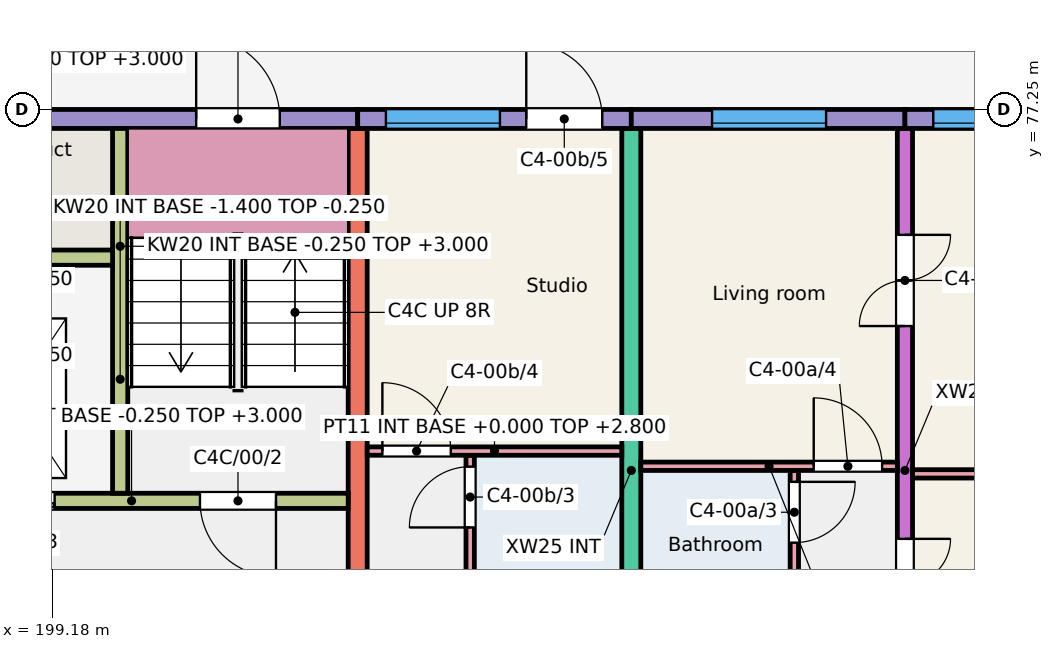
"""IFC4 building model, lengths in metres.
Left out: names, types, materials, properties, quantities, classifications, styles, units other than length and angle.
Written with IfcOpenShell. Run it as: python <this file> out.ifc"""

import sys

from ifc_helpers import new_model, si_unit, direction, frame, frame_2d, origin, place, context, subcontext, project, spatial, rectangle, extrude, element, fill, save


model = new_model("IFC4")
c1 = context("Model", 3, precision=1e-05, world=origin(), true_north=direction((0.0, 1.0)))
c2 = subcontext(c1, "Body", "Model", "MODEL_VIEW")
j1 = project(units=[si_unit("LENGTHUNIT", "METRE"), si_unit("PLANEANGLEUNIT", "RADIAN")], contexts=[c1])
p1 = place(None, origin())
s1 = spatial("IfcSite", under=j1, at=p1, CompositionType="ELEMENT")
p2 = place(p1, origin())
s2 = spatial("IfcBuilding", under=s1, at=p2, CompositionType="ELEMENT")
p3 = place(p2, origin())
s3 = spatial("IfcBuildingStorey", under=s2, at=p3, CompositionType="ELEMENT", Elevation=0.0)
for number, where, z_axis, x_axis in (
    (1, (203.2, 68.0, -0.25), (0.0, 0.0, 1.0), (0.0, 1.0, 0.0)),
    (2, (206.8, 68.0, -0.25), (0.0, 0.0, 1.0), (0.0, 1.0, 0.0)),
):
    element("IfcWall", number, at=place(p3, frame(where, z_axis=z_axis, x_axis=x_axis)), inside=s3, PredefinedType="SHEAR", context=c2, shape_type="SweptSolid", body=[
        extrude(rectangle(XDim=9.0, YDim=0.25, at=frame_2d((4.5, 0.0))), origin(), (0.0, 0.0, 1.0), 3.25),
    ])
p4 = place(p3, frame((210.4, 68.0, -0.25), z_axis=(0.0, 0.0, 1.0), x_axis=(0.0, 1.0, 0.0)))
e3 = element("IfcWall", 3, at=p4, inside=s3, PredefinedType="SHEAR", context=c2, shape_type="SweptSolid", body=[
    extrude(rectangle(XDim=9.0, YDim=0.2, at=frame_2d((4.5, 0.0))), origin(), (0.0, 0.0, 1.0), 3.25),
])
p5 = place(p4, frame((2.4, 0.0, 0.25)))
e4 = element("IfcOpeningElement", 4, at=p5, cuts=e3, PredefinedType="OPENING", context=c2, shape_type="SweptSolid", body=[
    extrude(rectangle(XDim=1.2, YDim=2.1, at=frame_2d((0.6, 1.05))), frame((0.0, 0.11, 0.0), z_axis=(0.0, -1.0, 0.0), x_axis=(1.0, 0.0, 0.0)), (0.0, 0.0, 1.0), 0.22),
])
p6 = place(p4, frame((6.4, 0.0, 0.25)))
e5 = element("IfcOpeningElement", 5, at=p6, cuts=e3, PredefinedType="OPENING", context=c2, shape_type="SweptSolid", body=[
    extrude(rectangle(XDim=1.2, YDim=2.1, at=frame_2d((0.6, 1.05))), frame((0.0, 0.11, 0.0), z_axis=(0.0, -1.0, 0.0), x_axis=(1.0, 0.0, 0.0)), (0.0, 0.0, 1.0), 0.22),
])
p7 = place(p3, frame((197.2, 77.125, -0.25), z_axis=(0.0, 0.0, 1.0), x_axis=(1.0, 0.0, 0.0)))
e6 = element("IfcWall", 6, at=p7, inside=s3, PredefinedType="SOLIDWALL", context=c2, shape_type="SweptSolid", body=[
    extrude(rectangle(XDim=6.0, YDim=0.25, at=frame_2d((3.0, 0.0))), origin(), (0.0, 0.0, 1.0), 3.25),
])
p8 = place(p7, frame((3.875, 0.0, 0.25)))
e7 = element("IfcOpeningElement", 7, at=p8, cuts=e6, PredefinedType="OPENING", context=c2, shape_type="SweptSolid", body=[
    extrude(rectangle(XDim=1.1, YDim=2.1, at=frame_2d((0.55, 1.05))), frame((0.0, 0.135, 0.0), z_axis=(0.0, -1.0, 0.0), x_axis=(1.0, 0.0, 0.0)), (0.0, 0.0, 1.0), 0.27),
])
p9 = place(p3, frame((197.35, 72.1, -0.25), z_axis=(0.0, 0.0, 1.0), x_axis=(1.0, 0.0, 0.0)))
e8 = element("IfcWall", 8, at=p9, inside=s3, PredefinedType="SHEAR", context=c2, shape_type="SweptSolid", body=[
    extrude(rectangle(XDim=5.725, YDim=0.2, at=frame_2d((2.862, 0.0))), origin(), (0.0, 0.0, 1.0), 3.25),
])
p10 = place(p9, frame((3.775, 0.0, 0.25)))
e9 = element("IfcOpeningElement", 9, at=p10, cuts=e8, PredefinedType="OPENING", context=c2, shape_type="SweptSolid", body=[
    extrude(rectangle(XDim=1.0, YDim=2.1, at=frame_2d((0.5, 1.05))), frame((0.0, 0.11, 0.0), z_axis=(0.0, -1.0, 0.0), x_axis=(1.0, 0.0, 0.0)), (0.0, 0.0, 1.0), 0.22),
])
p11 = place(p9, frame((0.762, 0.0, 0.25)))
e10 = element("IfcOpeningElement", 10, at=p11, cuts=e8, PredefinedType="OPENING", context=c2, shape_type="SweptSolid", body=[
    extrude(rectangle(XDim=1.1, YDim=2.1, at=frame_2d((0.55, 1.05))), frame((0.0, 0.11, 0.0), z_axis=(0.0, -1.0, 0.0), x_axis=(1.0, 0.0, 0.0)), (0.0, 0.0, 1.0), 0.22),
])
p12 = place(p3, frame((200.075, 72.2, -0.25), z_axis=(0.0, 0.0, 1.0), x_axis=(0.0, 1.0, 0.0)))
e11 = element("IfcWall", 11, at=p12, inside=s3, PredefinedType="SHEAR", context=c2, shape_type="SweptSolid", body=[
    extrude(rectangle(XDim=4.8, YDim=0.2, at=frame_2d((2.4, 0.0))), origin(), (0.0, 0.0, 1.0), 3.25),
])
p13 = place(p3, frame((197.35, 75.3, -0.25), z_axis=(0.0, 0.0, 1.0), x_axis=(1.0, 0.0, 0.0)))
e12 = element("IfcWall", 12, at=p13, inside=s3, PredefinedType="SHEAR", context=c2, shape_type="SweptSolid", body=[
    extrude(rectangle(XDim=2.625, YDim=0.2, at=frame_2d((1.312, 0.0))), origin(), (0.0, 0.0, 1.0), 3.25),
])
p14 = place(p3, frame((203.2, 77.125, -0.25), z_axis=(0.0, 0.0, 1.0), x_axis=(1.0, 0.0, 0.0)))
e13 = element("IfcWall", 13, at=p14, inside=s3, PredefinedType="SOLIDWALL", context=c2, shape_type="SweptSolid", body=[
    extrude(rectangle(XDim=3.6, YDim=0.25, at=frame_2d((1.8, 0.0))), origin(), (0.0, 0.0, 1.0), 3.25),
])
p15 = place(p14, frame((0.372, 0.0, 1.15)))
e14 = element("IfcOpeningElement", 14, at=p15, cuts=e13, PredefinedType="OPENING", context=c2, shape_type="SweptSolid", body=[
    extrude(rectangle(XDim=1.5, YDim=1.5, at=frame_2d((0.75, 0.75))), frame((0.0, 0.135, 0.0), z_axis=(0.0, -1.0, 0.0), x_axis=(1.0, 0.0, 0.0)), (0.0, 0.0, 1.0), 0.27),
])
p16 = place(p14, frame((2.218, 0.0, 0.25)))
e15 = element("IfcOpeningElement", 15, at=p16, cuts=e13, PredefinedType="OPENING", context=c2, shape_type="SweptSolid", body=[
    extrude(rectangle(XDim=1.0, YDim=2.1, at=frame_2d((0.5, 1.05))), frame((0.0, 0.135, 0.0), z_axis=(0.0, -1.0, 0.0), x_axis=(1.0, 0.0, 0.0)), (0.0, 0.0, 1.0), 0.27),
])
p17 = place(p3, frame((206.8, 77.125, -0.25), z_axis=(0.0, 0.0, 1.0), x_axis=(1.0, 0.0, 0.0)))
e16 = element("IfcWall", 16, at=p17, inside=s3, PredefinedType="SOLIDWALL", context=c2, shape_type="SweptSolid", body=[
    extrude(rectangle(XDim=3.6, YDim=0.25, at=frame_2d((1.8, 0.0))), origin(), (0.0, 0.0, 1.0), 3.25),
])
p18 = place(p17, frame((1.062, 0.0, 1.15)))
e17 = element("IfcOpeningElement", 17, at=p18, cuts=e16, PredefinedType="OPENING", context=c2, shape_type="SweptSolid", body=[
    extrude(rectangle(XDim=1.5, YDim=1.5, at=frame_2d((0.75, 0.75))), frame((0.0, 0.135, 0.0), z_axis=(0.0, -1.0, 0.0), x_axis=(1.0, 0.0, 0.0)), (0.0, 0.0, 1.0), 0.27),
])
p19 = place(p3, frame((210.4, 77.125, -0.25), z_axis=(0.0, 0.0, 1.0), x_axis=(1.0, 0.0, 0.0)))
e18 = element("IfcWall", 18, at=p19, inside=s3, PredefinedType="SOLIDWALL", context=c2, shape_type="SweptSolid", body=[
    extrude(rectangle(XDim=3.6, YDim=0.25, at=frame_2d((1.8, 0.0))), origin(), (0.0, 0.0, 1.0), 3.25),
])
p20 = place(p19, frame((0.373, 0.0, 1.15)))
e19 = element("IfcOpeningElement", 19, at=p20, cuts=e18, PredefinedType="OPENING", context=c2, shape_type="SweptSolid", body=[
    extrude(rectangle(XDim=1.5, YDim=1.5, at=frame_2d((0.75, 0.75))), frame((0.0, 0.135, 0.0), z_axis=(0.0, -1.0, 0.0), x_axis=(1.0, 0.0, 0.0)), (0.0, 0.0, 1.0), 0.27),
])
p21 = place(p19, frame((2.246, 0.0, 0.25)))
e20 = element("IfcOpeningElement", 20, at=p21, cuts=e18, PredefinedType="OPENING", context=c2, shape_type="SweptSolid", body=[
    extrude(rectangle(XDim=1.0, YDim=2.1, at=frame_2d((0.5, 1.05))), frame((0.0, 0.135, 0.0), z_axis=(0.0, -1.0, 0.0), x_axis=(1.0, 0.0, 0.0)), (0.0, 0.0, 1.0), 0.27),
])
for number, where, z_axis, x_axis in (
    (21, (197.2, 72.1, -1.4), (0.0, 0.0, 1.0), (1.0, 0.0, 0.0)),
    (22, (197.2, 75.3, -1.4), (0.0, 0.0, 1.0), (1.0, 0.0, 0.0)),
):
    element("IfcWall", number, at=place(p3, frame(where, z_axis=z_axis, x_axis=x_axis)), inside=s3, PredefinedType="SHEAR", context=c2, shape_type="SweptSolid", body=[
        extrude(rectangle(XDim=2.975, YDim=0.2, at=frame_2d((1.488, 0.0))), origin(), (0.0, 0.0, 1.0), 1.15),
    ])
p22 = place(p3, frame((200.075, 72.2, -1.4), z_axis=(0.0, 0.0, 1.0), x_axis=(0.0, 1.0, 0.0)))
e23 = element("IfcWall", 23, at=p22, inside=s3, PredefinedType="SHEAR", context=c2, shape_type="SweptSolid", body=[
    extrude(rectangle(XDim=3.0, YDim=0.2, at=frame_2d((1.5, 0.0))), origin(), (0.0, 0.0, 1.0), 1.15),
])
p23 = place(p3, frame((208.945, 68.0, 0.0), z_axis=(0.0, 0.0, 1.0), x_axis=(0.0, 1.0, 0.0)))
e24 = element("IfcWall", 24, at=p23, inside=s3, PredefinedType="PARTITIONING", context=c2, shape_type="SweptSolid", body=[
    extrude(rectangle(XDim=4.5, YDim=0.11, at=frame_2d((2.25, 0.0))), origin(), (0.0, 0.0, 1.0), 2.8),
])
p24 = place(p23, frame((0.2, 0.0, 0.0)))
e25 = element("IfcOpeningElement", 25, at=p24, cuts=e24, PredefinedType="OPENING", context=c2, shape_type="SweptSolid", body=[
    extrude(rectangle(XDim=0.8, YDim=2.1, at=frame_2d((0.4, 1.05))), frame((0.0, 0.065, 0.0), z_axis=(0.0, -1.0, 0.0), x_axis=(1.0, 0.0, 0.0)), (0.0, 0.0, 1.0), 0.13),
])
p25 = place(p23, frame((3.55, 0.0, 0.0)))
e26 = element("IfcOpeningElement", 26, at=p25, cuts=e24, PredefinedType="OPENING", context=c2, shape_type="SweptSolid", body=[
    extrude(rectangle(XDim=0.8, YDim=2.1, at=frame_2d((0.4, 1.05))), frame((0.0, 0.065, 0.0), z_axis=(0.0, -1.0, 0.0), x_axis=(1.0, 0.0, 0.0)), (0.0, 0.0, 1.0), 0.13),
])
p26 = place(p3, frame((206.925, 72.555, 0.0), z_axis=(0.0, 0.0, 1.0), x_axis=(1.0, 0.0, 0.0)))
e27 = element("IfcWall", 27, at=p26, inside=s3, PredefinedType="PARTITIONING", context=c2, shape_type="SweptSolid", body=[
    extrude(rectangle(XDim=3.375, YDim=0.11, at=frame_2d((1.688, 0.0))), origin(), (0.0, 0.0, 1.0), 2.8),
])
p27 = place(p26, frame((2.275, 0.0, 0.0)))
e28 = element("IfcOpeningElement", 28, at=p27, cuts=e27, PredefinedType="OPENING", context=c2, shape_type="SweptSolid", body=[
    extrude(rectangle(XDim=0.9, YDim=2.1, at=frame_2d((0.45, 1.05))), frame((0.0, 0.065, 0.0), z_axis=(0.0, -1.0, 0.0), x_axis=(1.0, 0.0, 0.0)), (0.0, 0.0, 1.0), 0.13),
])
p28 = place(p3, frame((210.5, 72.455, 0.0), z_axis=(0.0, 0.0, 1.0), x_axis=(1.0, 0.0, 0.0)))
e29 = element("IfcWall", 29, at=p28, inside=s3, PredefinedType="PARTITIONING", context=c2, shape_type="SweptSolid", body=[
    extrude(rectangle(XDim=3.35, YDim=0.11, at=frame_2d((1.675, 0.0))), origin(), (0.0, 0.0, 1.0), 2.8),
])
p29 = place(p3, frame((204.68, 68.0, 0.0), z_axis=(0.0, 0.0, 1.0), x_axis=(0.0, 1.0, 0.0)))
e30 = element("IfcWall", 30, at=p29, inside=s3, PredefinedType="PARTITIONING", context=c2, shape_type="SweptSolid", body=[
    extrude(rectangle(XDim=4.7, YDim=0.11, at=frame_2d((2.35, 0.0))), origin(), (0.0, 0.0, 1.0), 2.8),
])
p30 = place(p29, frame((0.2, 0.0, 0.0)))
e31 = element("IfcOpeningElement", 31, at=p30, cuts=e30, PredefinedType="OPENING", context=c2, shape_type="SweptSolid", body=[
    extrude(rectangle(XDim=0.8, YDim=2.1, at=frame_2d((0.4, 1.05))), frame((0.0, 0.065, 0.0), z_axis=(0.0, -1.0, 0.0), x_axis=(1.0, 0.0, 0.0)), (0.0, 0.0, 1.0), 0.13),
])
p31 = place(p29, frame((3.75, 0.0, 0.0)))
e32 = element("IfcOpeningElement", 32, at=p31, cuts=e30, PredefinedType="OPENING", context=c2, shape_type="SweptSolid", body=[
    extrude(rectangle(XDim=0.8, YDim=2.1, at=frame_2d((0.4, 1.05))), frame((0.0, 0.065, 0.0), z_axis=(0.0, -1.0, 0.0), x_axis=(1.0, 0.0, 0.0)), (0.0, 0.0, 1.0), 0.13),
])
p32 = place(p3, frame((203.325, 72.755, 0.0), z_axis=(0.0, 0.0, 1.0), x_axis=(1.0, 0.0, 0.0)))
e33 = element("IfcWall", 33, at=p32, inside=s3, PredefinedType="PARTITIONING", context=c2, shape_type="SweptSolid", body=[
    extrude(rectangle(XDim=3.35, YDim=0.11, at=frame_2d((1.675, 0.0))), origin(), (0.0, 0.0, 1.0), 2.8),
])
p33 = place(p32, frame((0.2, 0.0, 0.0)))
e34 = element("IfcOpeningElement", 34, at=p33, cuts=e33, PredefinedType="OPENING", context=c2, shape_type="SweptSolid", body=[
    extrude(rectangle(XDim=0.9, YDim=2.1, at=frame_2d((0.45, 1.05))), frame((0.0, 0.065, 0.0), z_axis=(0.0, -1.0, 0.0), x_axis=(1.0, 0.0, 0.0)), (0.0, 0.0, 1.0), 0.13),
])
p34 = place(p20, origin())
e35 = element("IfcWindow", 35, at=p34, inside=s3, PartitioningType="SINGLE_PANEL", PredefinedType="WINDOW", context=c2, shape_type="SweptSolid", body=[
    extrude(rectangle(XDim=1.5, YDim=1.5, at=frame_2d((0.75, 0.75))), frame((0.0, -0.025, 0.0), z_axis=(0.0, -1.0, 0.0), x_axis=(1.0, 0.0, 0.0)), (0.0, 0.0, 1.0), 0.06),
])
fill(e19, e35)
p35 = place(p18, origin())
e36 = element("IfcWindow", 36, at=p35, inside=s3, PartitioningType="SINGLE_PANEL", PredefinedType="WINDOW", context=c2, shape_type="SweptSolid", body=[
    extrude(rectangle(XDim=1.5, YDim=1.5, at=frame_2d((0.75, 0.75))), frame((0.0, -0.025, 0.0), z_axis=(0.0, -1.0, 0.0), x_axis=(1.0, 0.0, 0.0)), (0.0, 0.0, 1.0), 0.06),
])
fill(e17, e36)
p36 = place(p15, origin())
e37 = element("IfcWindow", 37, at=p36, inside=s3, PartitioningType="SINGLE_PANEL", PredefinedType="WINDOW", context=c2, shape_type="SweptSolid", body=[
    extrude(rectangle(XDim=1.5, YDim=1.5, at=frame_2d((0.75, 0.75))), frame((0.0, -0.025, 0.0), z_axis=(0.0, -1.0, 0.0), x_axis=(1.0, 0.0, 0.0)), (0.0, 0.0, 1.0), 0.06),
])
fill(e14, e37)
p37 = place(p25, origin())
e38 = element("IfcDoor", 38, at=p37, inside=s3, OperationType="SINGLE_SWING_RIGHT", PredefinedType="DOOR", context=c2, shape_type="SweptSolid", body=[
    extrude(rectangle(XDim=0.8, YDim=2.1, at=frame_2d((0.4, 1.05))), frame((0.0, 0.025, 0.0), z_axis=(0.0, -1.0, 0.0), x_axis=(1.0, 0.0, 0.0)), (0.0, 0.0, 1.0), 0.05),
])
fill(e26, e38)
p38 = place(p27, origin())
e39 = element("IfcDoor", 39, at=p38, inside=s3, OperationType="SINGLE_SWING_LEFT", PredefinedType="DOOR", context=c2, shape_type="SweptSolid", body=[
    extrude(rectangle(XDim=0.9, YDim=2.1, at=frame_2d((0.45, 1.05))), frame((0.0, 0.025, 0.0), z_axis=(0.0, -1.0, 0.0), x_axis=(1.0, 0.0, 0.0)), (0.0, 0.0, 1.0), 0.05),
])
fill(e28, e39)
p39 = place(p5, origin())
e40 = element("IfcDoor", 40, at=p39, inside=s3, OperationType="DOUBLE_DOOR_SINGLE_SWING", PredefinedType="DOOR", context=c2, shape_type="SweptSolid", body=[
    extrude(rectangle(XDim=1.2, YDim=2.1, at=frame_2d((0.6, 1.05))), frame((0.0, 0.025, 0.0), z_axis=(0.0, -1.0, 0.0), x_axis=(1.0, 0.0, 0.0)), (0.0, 0.0, 1.0), 0.05),
])
fill(e4, e40)
p40 = place(p6, origin())
e41 = element("IfcDoor", 41, at=p40, inside=s3, OperationType="DOUBLE_DOOR_SINGLE_SWING", PredefinedType="DOOR", context=c2, shape_type="SweptSolid", body=[
    extrude(rectangle(XDim=1.2, YDim=2.1, at=frame_2d((0.6, 1.05))), frame((0.0, 0.025, 0.0), z_axis=(0.0, -1.0, 0.0), x_axis=(1.0, 0.0, 0.0)), (0.0, 0.0, 1.0), 0.05),
])
fill(e5, e41)
p41 = place(p31, origin())
e42 = element("IfcDoor", 42, at=p41, inside=s3, OperationType="SINGLE_SWING_LEFT", PredefinedType="DOOR", context=c2, shape_type="SweptSolid", body=[
    extrude(rectangle(XDim=0.8, YDim=2.1, at=frame_2d((0.4, 1.05))), frame((0.0, 0.025, 0.0), z_axis=(0.0, -1.0, 0.0), x_axis=(1.0, 0.0, 0.0)), (0.0, 0.0, 1.0), 0.05),
])
fill(e32, e42)
p42 = place(p33, origin())
e43 = element("IfcDoor", 43, at=p42, inside=s3, OperationType="SINGLE_SWING_LEFT", PredefinedType="DOOR", context=c2, shape_type="SweptSolid", body=[
    extrude(rectangle(XDim=0.9, YDim=2.1, at=frame_2d((0.45, 1.05))), frame((0.0, 0.025, 0.0), z_axis=(0.0, -1.0, 0.0), x_axis=(1.0, 0.0, 0.0)), (0.0, 0.0, 1.0), 0.05),
])
fill(e34, e43)
p43 = place(p16, origin())
e44 = element("IfcDoor", 44, at=p43, inside=s3, OperationType="SINGLE_SWING_LEFT", PredefinedType="DOOR", context=c2, shape_type="SweptSolid", body=[
    extrude(rectangle(XDim=1.0, YDim=2.1, at=frame_2d((0.5, 1.05))), frame((0.0, 0.025, 0.0), z_axis=(0.0, -1.0, 0.0), x_axis=(1.0, 0.0, 0.0)), (0.0, 0.0, 1.0), 0.05),
])
fill(e15, e44)
p44 = place(p10, origin())
e45 = element("IfcDoor", 45, at=p44, inside=s3, OperationType="SINGLE_SWING_RIGHT", PredefinedType="DOOR", context=c2, shape_type="SweptSolid", body=[
    extrude(rectangle(XDim=1.0, YDim=2.1, at=frame_2d((0.5, 1.05))), frame((0.0, 0.025, 0.0), z_axis=(0.0, -1.0, 0.0), x_axis=(1.0, 0.0, 0.0)), (0.0, 0.0, 1.0), 0.05),
])
fill(e9, e45)
p45 = place(p11, origin())
e46 = element("IfcDoor", 46, at=p45, inside=s3, OperationType="DOUBLE_DOOR_SLIDING", PredefinedType="DOOR", context=c2, shape_type="SweptSolid", body=[
    extrude(rectangle(XDim=1.1, YDim=2.1, at=frame_2d((0.55, 1.05))), frame((0.0, 0.025, 0.0), z_axis=(0.0, -1.0, 0.0), x_axis=(1.0, 0.0, 0.0)), (0.0, 0.0, 1.0), 0.05),
])
fill(e10, e46)
p46 = place(p8, origin())
e47 = element("IfcDoor", 47, at=p46, inside=s3, OperationType="SINGLE_SWING_LEFT", PredefinedType="DOOR", context=c2, shape_type="SweptSolid", body=[
    extrude(rectangle(XDim=1.1, YDim=2.1, at=frame_2d((0.55, 1.05))), frame((0.0, 0.025, 0.0), z_axis=(0.0, -1.0, 0.0), x_axis=(1.0, 0.0, 0.0)), (0.0, 0.0, 1.0), 0.05),
])
fill(e7, e47)
save(model, sys.argv[1])
